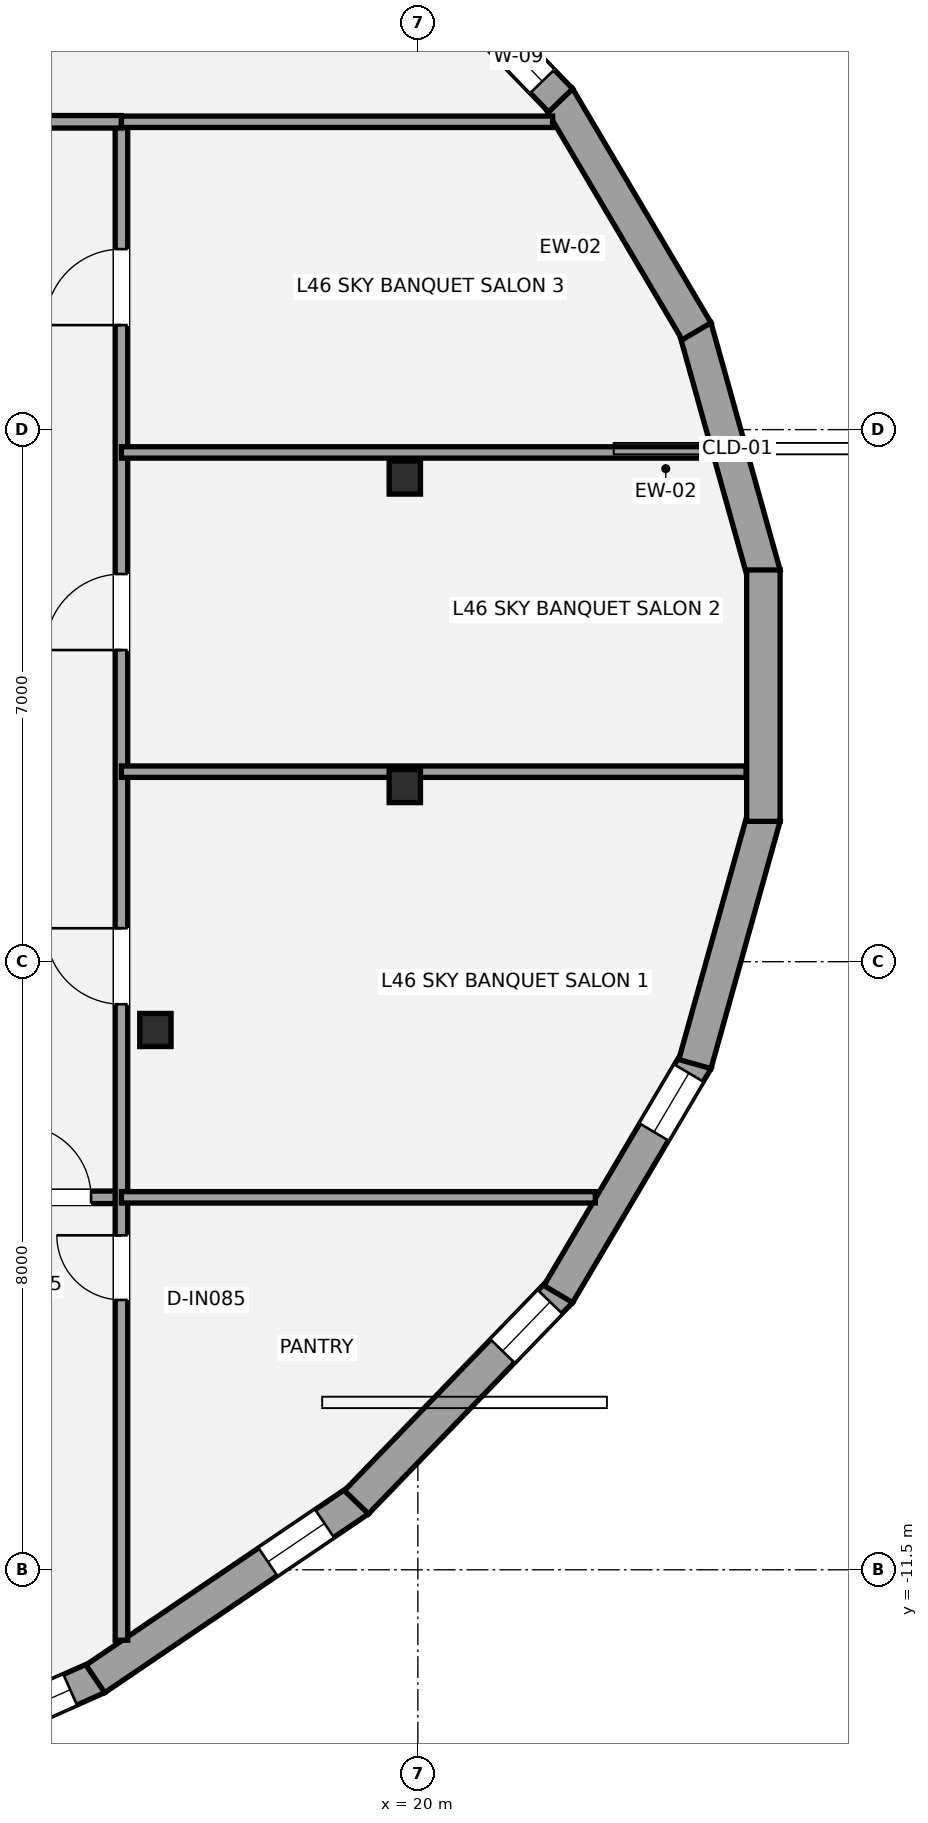
"""IFC4 building model, lengths in metres.
Left out: names, types, materials, properties, quantities, classifications, styles, units other than length and angle.
Written with IfcOpenShell. Run it as: python <this file> out.ifc"""

import sys

from ifc_helpers import new_model, si_unit, direction, frame, frame_2d, origin, origin_2d, place, context, subcontext, project, spatial, rectangle, i_section, extrude, element, fill, save


model = new_model("IFC4")
c1 = context("Model", 3, precision=1e-05, world=origin(), true_north=direction((0.0, 1.0)))
c2 = subcontext(c1, "Body", "Model", "MODEL_VIEW")
j1 = project(units=[si_unit("LENGTHUNIT", "METRE"), si_unit("PLANEANGLEUNIT", "RADIAN")], contexts=[c1])
p1 = place(None, origin())
s1 = spatial("IfcSite", under=j1, at=p1, CompositionType="ELEMENT")
p2 = place(p1, origin())
s2 = spatial("IfcBuilding", under=s1, at=p2, CompositionType="ELEMENT")
p3 = place(p2, frame((0.0, 0.0, 169.4)))
s3 = spatial("IfcBuildingStorey", under=s2, at=p3, CompositionType="ELEMENT", Elevation=169.4)
for number, where, z_axis, x_axis in (
    (1, (19.828, 2.869, 0.0), (0.0, 0.0, 1.0), (1.0, 0.0, 0.0)),
    (2, (16.547, -4.398, 0.0), (0.0, 0.0, 1.0), (1.0, 0.0, 0.0)),
    (3, (19.828, -1.189, 0.0), (0.0, 0.0, 1.0), (1.0, 0.0, 0.0)),
):
    element("IfcColumn", number, at=place(p3, frame(where, z_axis=z_axis, x_axis=x_axis)), inside=s3, PredefinedType="COLUMN", context=c2, shape_type="SweptSolid", body=[
        extrude(i_section(OverallWidth=0.412, OverallDepth=0.435, WebThickness=0.036, FlangeThickness=0.057, at=origin_2d()), origin(), (0.0, 0.0, 1.0), 3.2),
    ])
p4 = place(p3, frame((23.645, 4.846, 0.0), z_axis=(0.0, 0.0, 1.0), x_axis=(0.269235699479, -0.963074315993, 0.0)))
e4 = element("IfcWall", 4, at=p4, inside=s3, PredefinedType="STANDARD", context=c2, shape_type="SweptSolid", body=[
    extrude(rectangle(XDim=3.377, YDim=0.44, at=frame_2d((1.688, 0.0))), origin(), (0.0, 0.0, 1.0), 2.315),
])
p5 = place(p3, frame((21.847, 7.873, 0.0), z_axis=(0.0, 0.0, 1.0), x_axis=(0.508883387051, -0.860835465338, 0.0)))
e5 = element("IfcWall", 5, at=p5, inside=s3, PredefinedType="STANDARD", context=c2, shape_type="SweptSolid", body=[
    extrude(rectangle(XDim=3.577, YDim=0.44, at=frame_2d((1.788, 0.0))), origin(), (0.0, 0.0, 1.0), 2.315),
])
p6 = place(p3, frame((19.192, 10.612, 0.0), z_axis=(0.0, 0.0, 1.0), x_axis=(0.694975307772, -0.719033602544, 0.0)))
e6 = element("IfcWall", 6, at=p6, inside=s3, PredefinedType="STANDARD", context=c2, shape_type="SweptSolid", body=[
    extrude(rectangle(XDim=3.866, YDim=0.44, at=frame_2d((1.933, 0.0))), origin(), (0.0, 0.0, 1.0), 2.315),
])
p7 = place(p6, frame((2.618, 0.0, 0.58)))
e7 = element("IfcOpeningElement", 7, at=p7, cuts=e6, PredefinedType="OPENING", context=c2, shape_type="SweptSolid", body=[
    extrude(rectangle(XDim=0.9, YDim=1.35, at=frame_2d((0.45, 0.675))), frame((0.0, 0.23, 0.0), z_axis=(0.0, -1.0, 0.0), x_axis=(1.0, 0.0, 0.0)), (0.0, 0.0, 1.0), 0.46),
])
p8 = place(p3, frame((15.791, -12.916, 0.0), z_axis=(0.0, 0.0, 1.0), x_axis=(-0.913907994914, -0.405921392431, 0.0)))
e8 = element("IfcWall", 8, at=p8, inside=s3, PredefinedType="STANDARD", context=c2, shape_type="SweptSolid", body=[
    extrude(rectangle(XDim=4.487, YDim=0.44, at=frame_2d((2.244, 0.0))), origin(), (0.0, 0.0, 1.0), 2.315),
])
p9 = place(p8, frame((0.399, 0.0, 0.58)))
e9 = element("IfcOpeningElement", 9, at=p9, cuts=e8, PredefinedType="OPENING", context=c2, shape_type="SweptSolid", body=[
    extrude(rectangle(XDim=0.9, YDim=1.35, at=frame_2d((0.45, 0.675))), frame((0.0, 0.23, 0.0), z_axis=(0.0, -1.0, 0.0), x_axis=(1.0, 0.0, 0.0)), (0.0, 0.0, 1.0), 0.46),
])
p10 = place(p3, frame((19.227, -10.583, 0.0), z_axis=(0.0, 0.0, 1.0), x_axis=(-0.827760762475, -0.561081206338, 0.0)))
e10 = element("IfcWall", 10, at=p10, inside=s3, PredefinedType="STANDARD", context=c2, shape_type="SweptSolid", body=[
    extrude(rectangle(XDim=4.192, YDim=0.44, at=frame_2d((2.096, 0.0))), origin(), (0.0, 0.0, 1.0), 2.319),
])
p11 = place(p10, frame((0.549, 0.0, 0.58)))
e11 = element("IfcOpeningElement", 11, at=p11, cuts=e10, PredefinedType="OPENING", context=c2, shape_type="SweptSolid", body=[
    extrude(rectangle(XDim=0.9, YDim=1.35, at=frame_2d((0.45, 0.675))), frame((0.0, 0.23, 0.0), z_axis=(0.0, -1.0, 0.0), x_axis=(1.0, 0.0, 0.0)), (0.0, 0.0, 1.0), 0.46),
])
p12 = place(p3, frame((21.879, -7.832, 0.0), z_axis=(0.0, 0.0, 1.0), x_axis=(-0.694975307772, -0.719033602544, 0.0)))
e12 = element("IfcWall", 12, at=p12, inside=s3, PredefinedType="STANDARD", context=c2, shape_type="SweptSolid", body=[
    extrude(rectangle(XDim=3.866, YDim=0.44, at=frame_2d((1.933, 0.0))), origin(), (0.0, 0.0, 1.0), 2.315),
])
p13 = place(p12, frame((0.2, 0.0, 0.58)))
e13 = element("IfcOpeningElement", 13, at=p13, cuts=e12, PredefinedType="OPENING", context=c2, shape_type="SweptSolid", body=[
    extrude(rectangle(XDim=0.9, YDim=1.35, at=frame_2d((0.45, 0.675))), frame((0.0, 0.23, 0.0), z_axis=(0.0, -1.0, 0.0), x_axis=(1.0, 0.0, 0.0)), (0.0, 0.0, 1.0), 0.46),
])
p14 = place(p3, frame((23.667, -4.794, 0.0), z_axis=(0.0, 0.0, 1.0), x_axis=(-0.508883387051, -0.860835465338, 0.0)))
e14 = element("IfcWall", 14, at=p14, inside=s3, PredefinedType="STANDARD", context=c2, shape_type="SweptSolid", body=[
    extrude(rectangle(XDim=3.577, YDim=0.44, at=frame_2d((1.788, 0.0))), origin(), (0.0, 0.0, 1.0), 2.315),
])
p15 = place(p14, frame((0.2, 0.0, 0.42)))
e15 = element("IfcOpeningElement", 15, at=p15, cuts=e14, PredefinedType="OPENING", context=c2, shape_type="SweptSolid", body=[
    extrude(rectangle(XDim=0.9, YDim=1.35, at=frame_2d((0.45, 0.675))), frame((0.0, 0.23, 0.0), z_axis=(0.0, -1.0, 0.0), x_axis=(1.0, 0.0, 0.0)), (0.0, 0.0, 1.0), 0.46),
])
p16 = place(p3, frame((24.554, -1.594, 0.0), z_axis=(0.0, 0.0, 1.0), x_axis=(-0.269235699479, -0.963074315993, 0.0)))
e16 = element("IfcWall", 16, at=p16, inside=s3, PredefinedType="STANDARD", context=c2, shape_type="SweptSolid", body=[
    extrude(rectangle(XDim=3.377, YDim=0.44, at=frame_2d((1.688, 0.0))), origin(), (0.0, 0.0, 1.0), 2.315),
])
p17 = place(p3, frame((24.546, 1.654, 0.0), z_axis=(0.0, 0.0, 1.0), x_axis=(0.0, -1.0, 0.0)))
e17 = element("IfcWall", 17, at=p17, inside=s3, PredefinedType="STANDARD", context=c2, shape_type="SweptSolid", body=[
    extrude(rectangle(XDim=3.307, YDim=0.44, at=frame_2d((1.654, 0.0))), origin(), (0.0, 0.0, 1.0), 2.315),
])
p18 = place(p3, frame((-15.55, -6.6, 0.0), z_axis=(0.0, 0.0, 1.0), x_axis=(1.0, 0.0, 0.0)))
e18 = element("IfcWall", 18, at=p18, inside=s3, PredefinedType="PARTITIONING", context=c2, shape_type="SweptSolid", body=[
    extrude(rectangle(XDim=31.65, YDim=0.165, at=frame_2d((15.825, 0.0))), origin(), (0.0, 0.0, 1.0), 2.398),
])
p19 = place(p18, frame((14.7, 0.0, 0.0)))
e19 = element("IfcOpeningElement", 19, at=p19, cuts=e18, PredefinedType="OPENING", context=c2, shape_type="SweptSolid", body=[
    extrude(rectangle(XDim=0.95, YDim=2.15, at=frame_2d((0.475, 1.075))), frame((0.0, 0.093, 0.0), z_axis=(0.0, -1.0, 0.0), x_axis=(1.0, 0.0, 0.0)), (0.0, 0.0, 1.0), 0.185),
])
p20 = place(p18, frame((30.3, 0.0, 0.0)))
e20 = element("IfcOpeningElement", 20, at=p20, cuts=e18, PredefinedType="OPENING", context=c2, shape_type="SweptSolid", body=[
    extrude(rectangle(XDim=0.95, YDim=2.15, at=frame_2d((0.475, 1.075))), frame((0.0, 0.093, 0.0), z_axis=(0.0, -1.0, 0.0), x_axis=(1.0, 0.0, 0.0)), (0.0, 0.0, 1.0), 0.185),
])
p21 = place(p3, frame((16.1, -12.427, 0.0), z_axis=(0.0, 0.0, 1.0), x_axis=(0.0, 1.0, 0.0)))
e21 = element("IfcWall", 21, at=p21, inside=s3, PredefinedType="PARTITIONING", context=c2, shape_type="SweptSolid", body=[
    extrude(rectangle(XDim=19.977, YDim=0.165, at=frame_2d((9.988, 0.0))), origin(), (0.0, 0.0, 1.0), 2.473),
])
p22 = place(p21, frame((4.477, 0.0, 0.0)))
e22 = element("IfcOpeningElement", 22, at=p22, cuts=e21, PredefinedType="OPENING", context=c2, shape_type="SweptSolid", body=[
    extrude(rectangle(XDim=0.85, YDim=2.1, at=frame_2d((0.425, 1.05))), frame((0.0, 0.093, 0.0), z_axis=(0.0, -1.0, 0.0), x_axis=(1.0, 0.0, 0.0)), (0.0, 0.0, 1.0), 0.185),
])
p23 = place(p21, frame((8.367, 0.0, 0.0)))
e23 = element("IfcOpeningElement", 23, at=p23, cuts=e21, PredefinedType="OPENING", context=c2, shape_type="SweptSolid", body=[
    extrude(rectangle(XDim=1.0, YDim=2.15, at=frame_2d((0.5, 1.075))), frame((0.0, 0.093, 0.0), z_axis=(0.0, -1.0, 0.0), x_axis=(1.0, 0.0, 0.0)), (0.0, 0.0, 1.0), 0.185),
])
p24 = place(p21, frame((13.027, 0.0, 0.0)))
e24 = element("IfcOpeningElement", 24, at=p24, cuts=e21, PredefinedType="OPENING", context=c2, shape_type="SweptSolid", body=[
    extrude(rectangle(XDim=1.0, YDim=2.15, at=frame_2d((0.5, 1.075))), frame((0.0, 0.093, 0.0), z_axis=(0.0, -1.0, 0.0), x_axis=(1.0, 0.0, 0.0)), (0.0, 0.0, 1.0), 0.185),
])
p25 = place(p21, frame((17.302, 0.0, 0.0)))
e25 = element("IfcOpeningElement", 25, at=p25, cuts=e21, PredefinedType="OPENING", context=c2, shape_type="SweptSolid", body=[
    extrude(rectangle(XDim=1.0, YDim=2.15, at=frame_2d((0.5, 1.075))), frame((0.0, 0.093, 0.0), z_axis=(0.0, -1.0, 0.0), x_axis=(1.0, 0.0, 0.0)), (0.0, 0.0, 1.0), 0.185),
])
p26 = place(p3, frame((13.8, 7.55, 0.0), z_axis=(0.0, 0.0, 1.0), x_axis=(1.0, 0.0, 0.0)))
e26 = element("IfcWall", 26, at=p26, inside=s3, PredefinedType="PARTITIONING", context=c2, shape_type="SweptSolid", body=[
    extrude(rectangle(XDim=2.3, YDim=0.165, at=frame_2d((1.15, 0.0))), origin(), (0.0, 0.0, 1.0), 2.473),
])
p27 = place(p26, frame((0.3, 0.0, 0.0)))
e27 = element("IfcOpeningElement", 27, at=p27, cuts=e26, PredefinedType="OPENING", context=c2, shape_type="SweptSolid", body=[
    extrude(rectangle(XDim=1.0, YDim=2.15, at=frame_2d((0.5, 1.075))), frame((0.0, 0.093, 0.0), z_axis=(0.0, -1.0, 0.0), x_axis=(1.0, 0.0, 0.0)), (0.0, 0.0, 1.0), 0.185),
])
p28 = place(p3, frame((16.1, 7.55, 0.0), z_axis=(0.0, 0.0, 1.0), x_axis=(1.0, 0.0, 0.0)))
e28 = element("IfcWall", 28, at=p28, inside=s3, PredefinedType="PLUMBINGWALL", context=c2, shape_type="SweptSolid", body=[
    extrude(rectangle(XDim=5.673, YDim=0.15, at=frame_2d((2.836, 0.0))), origin(), (0.0, 0.0, 1.0), 2.473),
])
p29 = place(p3, frame((16.1, -6.6, 0.0), z_axis=(0.0, 0.0, 1.0), x_axis=(1.0, 0.0, 0.0)))
e29 = element("IfcWall", 29, at=p29, inside=s3, PredefinedType="PLUMBINGWALL", context=c2, shape_type="SweptSolid", body=[
    extrude(rectangle(XDim=6.235, YDim=0.15, at=frame_2d((3.117, 0.0))), origin(), (0.0, 0.0, 1.0), 2.473),
])
p30 = place(p3, frame((16.1, -1.0, 0.0), z_axis=(0.0, 0.0, 1.0), x_axis=(1.0, 0.0, 0.0)))
e30 = element("IfcWall", 30, at=p30, inside=s3, PredefinedType="PLUMBINGWALL", context=c2, shape_type="SweptSolid", body=[
    extrude(rectangle(XDim=8.218, YDim=0.15, at=frame_2d((4.109, 0.0))), origin(), (0.0, 0.0, 1.0), 2.473),
])
p31 = place(p3, frame((16.1, 3.2, 0.0), z_axis=(0.0, 0.0, 1.0), x_axis=(1.0, 0.0, 0.0)))
e31 = element("IfcWall", 31, at=p31, inside=s3, PredefinedType="PLUMBINGWALL", context=c2, shape_type="SweptSolid", body=[
    extrude(rectangle(XDim=7.768, YDim=0.15, at=frame_2d((3.884, 0.0))), origin(), (0.0, 0.0, 1.0), 3.02),
])
p32 = place(p7, origin())
e32 = element("IfcWindow", 32, at=p32, inside=s3, PartitioningType="SINGLE_PANEL", PredefinedType="WINDOW", context=c2, shape_type="SweptSolid", body=[
    extrude(rectangle(XDim=0.9, YDim=1.35, at=frame_2d((0.45, 0.675))), frame((0.0, -0.01, 0.0), z_axis=(0.0, -1.0, 0.0), x_axis=(1.0, 0.0, 0.0)), (0.0, 0.0, 1.0), 0.06),
])
fill(e7, e32)
p33 = place(p9, origin())
e33 = element("IfcWindow", 33, at=p33, inside=s3, PartitioningType="SINGLE_PANEL", PredefinedType="WINDOW", context=c2, shape_type="SweptSolid", body=[
    extrude(rectangle(XDim=0.9, YDim=1.35, at=frame_2d((0.45, 0.675))), frame((0.0, -0.01, 0.0), z_axis=(0.0, -1.0, 0.0), x_axis=(1.0, 0.0, 0.0)), (0.0, 0.0, 1.0), 0.06),
])
fill(e9, e33)
p34 = place(p11, origin())
e34 = element("IfcWindow", 34, at=p34, inside=s3, PartitioningType="SINGLE_PANEL", PredefinedType="WINDOW", context=c2, shape_type="SweptSolid", body=[
    extrude(rectangle(XDim=0.9, YDim=1.35, at=frame_2d((0.45, 0.675))), frame((0.0, -0.01, 0.0), z_axis=(0.0, -1.0, 0.0), x_axis=(1.0, 0.0, 0.0)), (0.0, 0.0, 1.0), 0.06),
])
fill(e11, e34)
p35 = place(p13, origin())
e35 = element("IfcWindow", 35, at=p35, inside=s3, PartitioningType="SINGLE_PANEL", PredefinedType="WINDOW", context=c2, shape_type="SweptSolid", body=[
    extrude(rectangle(XDim=0.9, YDim=1.35, at=frame_2d((0.45, 0.675))), frame((0.0, -0.01, 0.0), z_axis=(0.0, -1.0, 0.0), x_axis=(1.0, 0.0, 0.0)), (0.0, 0.0, 1.0), 0.06),
])
fill(e13, e35)
p36 = place(p15, origin())
e36 = element("IfcWindow", 36, at=p36, inside=s3, PartitioningType="SINGLE_PANEL", PredefinedType="WINDOW", context=c2, shape_type="SweptSolid", body=[
    extrude(rectangle(XDim=0.9, YDim=1.35, at=frame_2d((0.45, 0.675))), frame((0.0, -0.01, 0.0), z_axis=(0.0, -1.0, 0.0), x_axis=(1.0, 0.0, 0.0)), (0.0, 0.0, 1.0), 0.06),
])
fill(e15, e36)
p37 = place(p22, origin())
e37 = element("IfcDoor", 37, at=p37, inside=s3, OperationType="SINGLE_SWING_RIGHT", PredefinedType="DOOR", context=c2, shape_type="SweptSolid", body=[
    extrude(rectangle(XDim=0.85, YDim=2.1, at=frame_2d((0.425, 1.05))), frame((0.0, 0.025, 0.0), z_axis=(0.0, -1.0, 0.0), x_axis=(1.0, 0.0, 0.0)), (0.0, 0.0, 1.0), 0.05),
])
fill(e22, e37)
p38 = place(p20, origin())
e38 = element("IfcDoor", 38, at=p38, inside=s3, OperationType="SINGLE_SWING_LEFT", PredefinedType="DOOR", context=c2, shape_type="SweptSolid", body=[
    extrude(rectangle(XDim=0.95, YDim=2.15, at=frame_2d((0.475, 1.075))), frame((0.0, 0.025, 0.0), z_axis=(0.0, -1.0, 0.0), x_axis=(1.0, 0.0, 0.0)), (0.0, 0.0, 1.0), 0.05),
])
fill(e20, e38)
p39 = place(p23, origin())
e39 = element("IfcDoor", 39, at=p39, inside=s3, OperationType="SINGLE_SWING_RIGHT", PredefinedType="DOOR", context=c2, shape_type="SweptSolid", body=[
    extrude(rectangle(XDim=1.0, YDim=2.15, at=frame_2d((0.5, 1.075))), frame((0.0, 0.025, 0.0), z_axis=(0.0, -1.0, 0.0), x_axis=(1.0, 0.0, 0.0)), (0.0, 0.0, 1.0), 0.05),
])
fill(e23, e39)
p40 = place(p24, origin())
e40 = element("IfcDoor", 40, at=p40, inside=s3, OperationType="SINGLE_SWING_LEFT", PredefinedType="DOOR", context=c2, shape_type="SweptSolid", body=[
    extrude(rectangle(XDim=1.0, YDim=2.15, at=frame_2d((0.5, 1.075))), frame((0.0, 0.025, 0.0), z_axis=(0.0, -1.0, 0.0), x_axis=(1.0, 0.0, 0.0)), (0.0, 0.0, 1.0), 0.05),
])
fill(e24, e40)
p41 = place(p25, origin())
e41 = element("IfcDoor", 41, at=p41, inside=s3, OperationType="SINGLE_SWING_LEFT", PredefinedType="DOOR", context=c2, shape_type="SweptSolid", body=[
    extrude(rectangle(XDim=1.0, YDim=2.15, at=frame_2d((0.5, 1.075))), frame((0.0, 0.025, 0.0), z_axis=(0.0, -1.0, 0.0), x_axis=(1.0, 0.0, 0.0)), (0.0, 0.0, 1.0), 0.05),
])
fill(e25, e41)
save(model, sys.argv[1])
